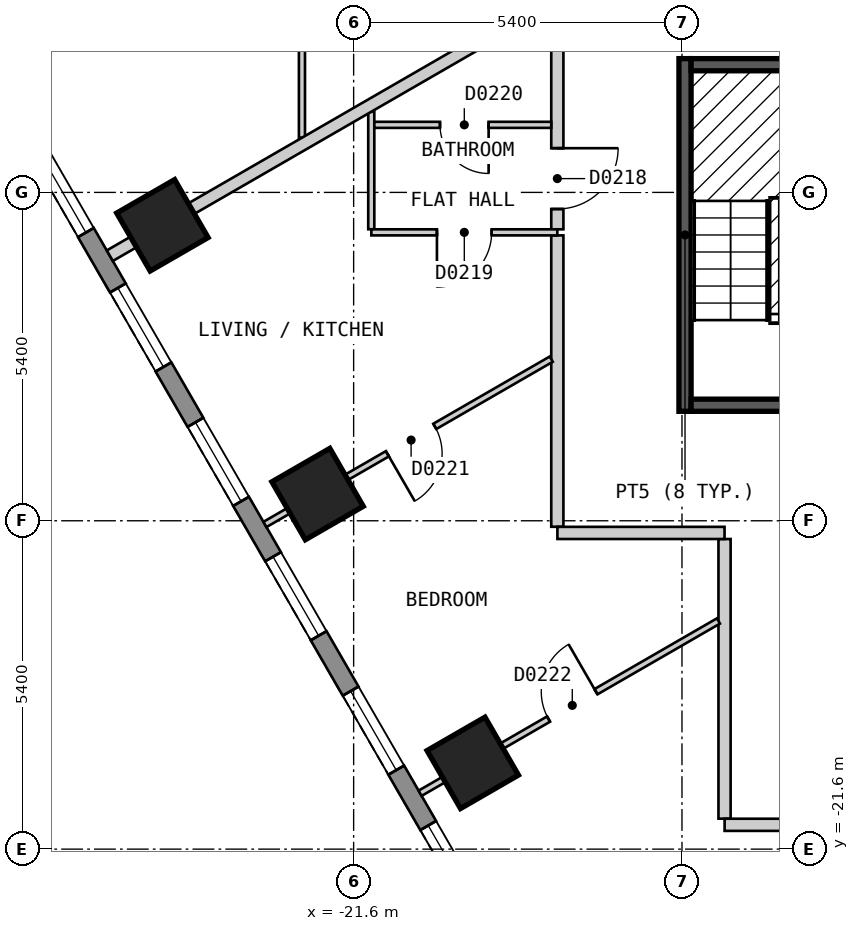
"""IFC4 building model, lengths in metres.
Left out: names, types, materials, properties, quantities, classifications, styles, units other than length and angle.
Written with IfcOpenShell. Run it as: python <this file> out.ifc"""

import sys

from ifc_helpers import new_model, si_unit, direction, frame, frame_2d, origin, origin_2d, place, context, subcontext, project, spatial, polyline, rectangle, outline, extrude, element, fill, save


model = new_model("IFC4")
c1 = context("Model", 3, precision=1e-05, world=origin(), true_north=direction((0.0, 1.0)))
c2 = subcontext(c1, "Body", "Model", "MODEL_VIEW")
j1 = project(units=[si_unit("LENGTHUNIT", "METRE"), si_unit("PLANEANGLEUNIT", "RADIAN")], contexts=[c1])
p1 = place(None, origin())
s1 = spatial("IfcSite", under=j1, at=p1, CompositionType="ELEMENT")
p2 = place(p1, origin())
s2 = spatial("IfcBuilding", under=s1, at=p2, CompositionType="ELEMENT")
p3 = place(p2, frame((0.0, 0.0, 41.4)))
s3 = spatial("IfcBuildingStorey", under=s2, at=p3, CompositionType="ELEMENT", Elevation=41.4)
for number, where, z_axis, x_axis in (
    (1, (-24.745, -11.341, 0.0), (0.0, 0.0, 1.0), (0.5, -0.866, 0.0)),
    (2, (-22.193, -15.761, 0.0), (0.0, 0.0, 1.0), (0.5, -0.866, 0.0)),
    (3, (-19.641, -20.181, 0.0), (0.0, 0.0, 1.0), (0.5, -0.866, 0.0)),
):
    element("IfcColumn", number, at=place(p3, frame(where, z_axis=z_axis, x_axis=x_axis)), inside=s3, PredefinedType="COLUMN", context=c2, shape_type="SweptSolid", body=[
        extrude(rectangle(XDim=1.1, YDim=1.1, at=origin_2d()), origin(), (0.0, 0.0, 1.0), 3.0),
    ])
p4 = place(p3, frame((-31.22, -2.425, 0.0), z_axis=(0.0, 0.0, 1.0), x_axis=(0.500001938803, -0.866024284413, 0.0)))
e4 = element("IfcWall", 4, at=p4, inside=s3, PredefinedType="SOLIDWALL", context=c2, shape_type="SweptSolid", body=[
    extrude(outline(polyline([(0.0, -0.15), (27.02, -0.15), (26.94, 0.15), (0.08, 0.15), (0.0, -0.15)])), origin(), (0.0, 0.0, 1.0), 2.7),
])
p5 = place(p4, frame((1.277, 0.0, 0.15)))
e5 = element("IfcOpeningElement", 5, at=p5, cuts=e4, PredefinedType="OPENING", context=c2, shape_type="SweptSolid", body=[
    extrude(rectangle(XDim=1.5, YDim=2.1, at=frame_2d((0.75, 1.05))), frame((0.0, 0.16, 0.0), z_axis=(0.0, -1.0, 0.0), x_axis=(1.0, 0.0, 0.0)), (0.0, 0.0, 1.0), 0.32),
])
p6 = place(p4, frame((3.829, 0.0, 0.15)))
e6 = element("IfcOpeningElement", 6, at=p6, cuts=e4, PredefinedType="OPENING", context=c2, shape_type="SweptSolid", body=[
    extrude(rectangle(XDim=1.5, YDim=2.1, at=frame_2d((0.75, 1.05))), frame((0.0, 0.16, 0.0), z_axis=(0.0, -1.0, 0.0), x_axis=(1.0, 0.0, 0.0)), (0.0, 0.0, 1.0), 0.32),
])
p7 = place(p4, frame((6.382, 0.0, 0.15)))
e7 = element("IfcOpeningElement", 7, at=p7, cuts=e4, PredefinedType="OPENING", context=c2, shape_type="SweptSolid", body=[
    extrude(rectangle(XDim=1.5, YDim=2.1, at=frame_2d((0.75, 1.05))), frame((0.0, 0.16, 0.0), z_axis=(0.0, -1.0, 0.0), x_axis=(1.0, 0.0, 0.0)), (0.0, 0.0, 1.0), 0.32),
])
p8 = place(p4, frame((8.933, 0.0, 0.15)))
e8 = element("IfcOpeningElement", 8, at=p8, cuts=e4, PredefinedType="OPENING", context=c2, shape_type="SweptSolid", body=[
    extrude(rectangle(XDim=1.5, YDim=2.1, at=frame_2d((0.75, 1.05))), frame((0.0, 0.16, 0.0), z_axis=(0.0, -1.0, 0.0), x_axis=(1.0, 0.0, 0.0)), (0.0, 0.0, 1.0), 0.32),
])
p9 = place(p4, frame((11.485, 0.0, 0.15)))
e9 = element("IfcOpeningElement", 9, at=p9, cuts=e4, PredefinedType="OPENING", context=c2, shape_type="SweptSolid", body=[
    extrude(rectangle(XDim=1.5, YDim=2.1, at=frame_2d((0.75, 1.05))), frame((0.0, 0.16, 0.0), z_axis=(0.0, -1.0, 0.0), x_axis=(1.0, 0.0, 0.0)), (0.0, 0.0, 1.0), 0.32),
])
p10 = place(p4, frame((14.037, 0.0, 0.15)))
e10 = element("IfcOpeningElement", 10, at=p10, cuts=e4, PredefinedType="OPENING", context=c2, shape_type="SweptSolid", body=[
    extrude(rectangle(XDim=1.5, YDim=2.1, at=frame_2d((0.75, 1.05))), frame((0.0, 0.16, 0.0), z_axis=(0.0, -1.0, 0.0), x_axis=(1.0, 0.0, 0.0)), (0.0, 0.0, 1.0), 0.32),
])
p11 = place(p4, frame((16.589, 0.0, 0.15)))
e11 = element("IfcOpeningElement", 11, at=p11, cuts=e4, PredefinedType="OPENING", context=c2, shape_type="SweptSolid", body=[
    extrude(rectangle(XDim=1.5, YDim=2.1, at=frame_2d((0.75, 1.05))), frame((0.0, 0.16, 0.0), z_axis=(0.0, -1.0, 0.0), x_axis=(1.0, 0.0, 0.0)), (0.0, 0.0, 1.0), 0.32),
])
p12 = place(p4, frame((19.141, 0.0, 0.15)))
e12 = element("IfcOpeningElement", 12, at=p12, cuts=e4, PredefinedType="OPENING", context=c2, shape_type="SweptSolid", body=[
    extrude(rectangle(XDim=1.5, YDim=2.1, at=frame_2d((0.75, 1.05))), frame((0.0, 0.16, 0.0), z_axis=(0.0, -1.0, 0.0), x_axis=(1.0, 0.0, 0.0)), (0.0, 0.0, 1.0), 0.32),
])
p13 = place(p4, frame((21.693, 0.0, 0.15)))
e13 = element("IfcOpeningElement", 13, at=p13, cuts=e4, PredefinedType="OPENING", context=c2, shape_type="SweptSolid", body=[
    extrude(rectangle(XDim=1.5, YDim=2.1, at=frame_2d((0.75, 1.05))), frame((0.0, 0.16, 0.0), z_axis=(0.0, -1.0, 0.0), x_axis=(1.0, 0.0, 0.0)), (0.0, 0.0, 1.0), 0.32),
])
p14 = place(p4, frame((24.244, 0.0, 0.15)))
e14 = element("IfcOpeningElement", 14, at=p14, cuts=e4, PredefinedType="OPENING", context=c2, shape_type="SweptSolid", body=[
    extrude(rectangle(XDim=1.5, YDim=2.1, at=frame_2d((0.75, 1.05))), frame((0.0, 0.16, 0.0), z_axis=(0.0, -1.0, 0.0), x_axis=(1.0, 0.0, 0.0)), (0.0, 0.0, 1.0), 0.32),
])
p15 = place(p3, frame((-15.5, -16.5, 0.0), z_axis=(0.0, 0.0, 1.0), x_axis=(0.0, -1.0, 0.0)))
e15 = element("IfcWall", 15, at=p15, inside=s3, PredefinedType="PARTITIONING", context=c2, shape_type="SweptSolid", body=[
    extrude(rectangle(XDim=4.599, YDim=0.2, at=frame_2d((2.3, 0.0))), origin(), (0.0, 0.0, 1.0), 2.7),
])
p16 = place(p3, frame((-18.25, -11.507, 0.0), z_axis=(0.0, 0.0, 1.0), x_axis=(0.0, -1.0, 0.0)))
e16 = element("IfcWall", 16, at=p16, inside=s3, PredefinedType="PARTITIONING", context=c2, shape_type="SweptSolid", body=[
    extrude(rectangle(XDim=4.792, YDim=0.2, at=frame_2d((2.396, 0.0))), origin(), (0.0, 0.0, 1.0), 2.7),
])
p17 = place(p3, frame((-18.249, -16.4, 0.0), z_axis=(0.0, 0.0, 1.0), x_axis=(1.0, 0.0, 0.0)))
e17 = element("IfcWall", 17, at=p17, inside=s3, PredefinedType="PARTITIONING", context=c2, shape_type="SweptSolid", body=[
    extrude(rectangle(XDim=2.749, YDim=0.2, at=frame_2d((1.375, 0.0))), origin(), (0.0, 0.0, 1.0), 2.7),
])
p18 = place(p3, frame((-15.499, -21.2, 0.0), z_axis=(0.0, 0.0, 1.0), x_axis=(1.0, 0.0, 0.0)))
e18 = element("IfcWall", 18, at=p18, inside=s3, PredefinedType="PARTITIONING", context=c2, shape_type="SweptSolid", body=[
    extrude(rectangle(XDim=30.898, YDim=0.2, at=frame_2d((15.449, 0.0))), origin(), (0.0, 0.0, 1.0), 2.7),
])
p19 = place(p18, frame((5.084, 0.0, 0.0)))
e19 = element("IfcOpeningElement", 19, at=p19, cuts=e18, PredefinedType="OPENING", context=c2, shape_type="SweptSolid", body=[
    extrude(rectangle(XDim=0.9, YDim=2.1, at=frame_2d((0.45, 1.05))), frame((0.0, 0.11, 0.0), z_axis=(0.0, -1.0, 0.0), x_axis=(1.0, 0.0, 0.0)), (0.0, 0.0, 1.0), 0.22),
])
p20 = place(p18, frame((15.0, 0.0, 0.0)))
e20 = element("IfcOpeningElement", 20, at=p20, cuts=e18, PredefinedType="OPENING", context=c2, shape_type="SweptSolid", body=[
    extrude(rectangle(XDim=1.0, YDim=2.1, at=frame_2d((0.5, 1.05))), frame((0.0, 0.11, 0.0), z_axis=(0.0, -1.0, 0.0), x_axis=(1.0, 0.0, 0.0)), (0.0, 0.0, 1.0), 0.22),
])
p21 = place(p18, frame((25.015, 0.0, 0.0)))
e21 = element("IfcOpeningElement", 21, at=p21, cuts=e18, PredefinedType="OPENING", context=c2, shape_type="SweptSolid", body=[
    extrude(rectangle(XDim=0.9, YDim=2.1, at=frame_2d((0.45, 1.05))), frame((0.0, 0.11, 0.0), z_axis=(0.0, -1.0, 0.0), x_axis=(1.0, 0.0, 0.0)), (0.0, 0.0, 1.0), 0.22),
])
p22 = place(p3, frame((-18.25, -11.407, 0.0), z_axis=(0.0, 0.0, 1.0), x_axis=(0.0, 1.0, 0.0)))
e22 = element("IfcWall", 22, at=p22, inside=s3, PredefinedType="PARTITIONING", context=c2, shape_type="SweptSolid", body=[
    extrude(rectangle(XDim=3.665, YDim=0.2, at=frame_2d((1.833, 0.0))), origin(), (0.0, 0.0, 1.0), 2.7),
])
p23 = place(p22, frame((0.334, 0.0, 0.0)))
e23 = element("IfcOpeningElement", 23, at=p23, cuts=e22, PredefinedType="OPENING", context=c2, shape_type="SweptSolid", body=[
    extrude(rectangle(XDim=1.0, YDim=2.1, at=frame_2d((0.5, 1.05))), frame((0.0, 0.11, 0.0), z_axis=(0.0, -1.0, 0.0), x_axis=(1.0, 0.0, 0.0)), (0.0, 0.0, 1.0), 0.22),
])
p24 = place(p3, frame((-21.31, -9.474, 0.0), z_axis=(0.0, 0.0, 1.0), x_axis=(0.0, -1.0, 0.0)))
e24 = element("IfcWall", 24, at=p24, inside=s3, PredefinedType="PARTITIONING", context=c2, shape_type="SweptSolid", body=[
    extrude(rectangle(XDim=1.932, YDim=0.1, at=frame_2d((0.966, 0.0))), origin(), (0.0, 0.0, 1.0), 2.7),
])
p25 = place(p3, frame((-21.26, -9.689, 0.0), z_axis=(0.0, 0.0, 1.0), x_axis=(1.0, 0.0, 0.0)))
e25 = element("IfcWall", 25, at=p25, inside=s3, PredefinedType="PARTITIONING", context=c2, shape_type="SweptSolid", body=[
    extrude(rectangle(XDim=2.91, YDim=0.1, at=frame_2d((1.455, 0.0))), origin(), (0.0, 0.0, 1.0), 2.7),
])
p26 = place(p25, frame((1.08, 0.0, 0.0)))
e26 = element("IfcOpeningElement", 26, at=p26, cuts=e25, PredefinedType="OPENING", context=c2, shape_type="SweptSolid", body=[
    extrude(rectangle(XDim=0.8, YDim=2.1, at=frame_2d((0.4, 1.05))), frame((0.0, 0.06, 0.0), z_axis=(0.0, -1.0, 0.0), x_axis=(1.0, 0.0, 0.0)), (0.0, 0.0, 1.0), 0.12),
])
p27 = place(p3, frame((-21.309, -11.457, 0.0), z_axis=(0.0, 0.0, 1.0), x_axis=(1.0, 0.0, 0.0)))
e27 = element("IfcWall", 27, at=p27, inside=s3, PredefinedType="PARTITIONING", context=c2, shape_type="SweptSolid", body=[
    extrude(rectangle(XDim=3.059, YDim=0.1, at=frame_2d((1.53, 0.0))), origin(), (0.0, 0.0, 1.0), 2.7),
])
p28 = place(p27, frame((1.079, 0.0, 0.0)))
e28 = element("IfcOpeningElement", 28, at=p28, cuts=e27, PredefinedType="OPENING", context=c2, shape_type="SweptSolid", body=[
    extrude(rectangle(XDim=0.9, YDim=2.1, at=frame_2d((0.45, 1.05))), frame((0.0, 0.06, 0.0), z_axis=(0.0, -1.0, 0.0), x_axis=(1.0, 0.0, 0.0)), (0.0, 0.0, 1.0), 0.12),
])
p29 = place(p3, frame((-22.45, -9.901, 0.0), z_axis=(0.0, 0.0, 1.0), x_axis=(0.0, 1.0, 0.0)))
e29 = element("IfcWall", 29, at=p29, inside=s3, PredefinedType="PARTITIONING", context=c2, shape_type="SweptSolid", body=[
    extrude(rectangle(XDim=4.385, YDim=0.1, at=frame_2d((2.192, 0.0))), origin(), (0.0, 0.0, 1.0), 2.7),
])
p30 = place(p29, frame((2.855, 0.0, 0.0)))
e30 = element("IfcOpeningElement", 30, at=p30, cuts=e29, PredefinedType="OPENING", context=c2, shape_type="SweptSolid", body=[
    extrude(rectangle(XDim=0.9, YDim=2.1, at=frame_2d((0.45, 1.05))), frame((0.0, 0.06, 0.0), z_axis=(0.0, -1.0, 0.0), x_axis=(1.0, 0.0, 0.0)), (0.0, 0.0, 1.0), 0.12),
])
p31 = place(p3, frame((-20.507, -20.681, 0.0), z_axis=(0.0, 0.0, 1.0), x_axis=(0.866028446103, 0.499994730513, 0.0)))
e31 = element("IfcWall", 31, at=p31, inside=s3, PredefinedType="PARTITIONING", context=c2, shape_type="SweptSolid", body=[
    extrude(rectangle(XDim=5.666, YDim=0.1, at=frame_2d((2.833, 0.0))), origin(), (0.0, 0.0, 1.0), 2.7),
])
p32 = place(p31, frame((2.44, 0.0, 0.0)))
e32 = element("IfcOpeningElement", 32, at=p32, cuts=e31, PredefinedType="OPENING", context=c2, shape_type="SweptSolid", body=[
    extrude(rectangle(XDim=0.9, YDim=2.1, at=frame_2d((0.45, 1.05))), frame((0.0, 0.06, 0.0), z_axis=(0.0, -1.0, 0.0), x_axis=(1.0, 0.0, 0.0)), (0.0, 0.0, 1.0), 0.12),
])
p33 = place(p3, frame((-23.059, -16.261, 0.0), z_axis=(0.0, 0.0, 1.0), x_axis=(0.866004639177, 0.500035963631, 0.0)))
e33 = element("IfcWall", 33, at=p33, inside=s3, PredefinedType="PARTITIONING", context=c2, shape_type="SweptSolid", body=[
    extrude(rectangle(XDim=5.438, YDim=0.1, at=frame_2d((2.719, 0.0))), origin(), (0.0, 0.0, 1.0), 2.7),
])
p34 = place(p33, frame((2.326, 0.0, 0.0)))
e34 = element("IfcOpeningElement", 34, at=p34, cuts=e33, PredefinedType="OPENING", context=c2, shape_type="SweptSolid", body=[
    extrude(rectangle(XDim=0.9, YDim=2.1, at=frame_2d((0.45, 1.05))), frame((0.0, 0.06, 0.0), z_axis=(0.0, -1.0, 0.0), x_axis=(1.0, 0.0, 0.0)), (0.0, 0.0, 1.0), 0.12),
])
p35 = place(p3, frame((-25.61, -11.841, 0.0), z_axis=(0.0, 0.0, 1.0), x_axis=(0.866019023803, 0.500011050288, 0.0)))
e35 = element("IfcWall", 35, at=p35, inside=s3, PredefinedType="PARTITIONING", context=c2, shape_type="SweptSolid", body=[
    extrude(rectangle(XDim=8.47, YDim=0.2, at=frame_2d((4.235, 0.0))), origin(), (0.0, 0.0, 1.0), 2.7),
])
p36 = place(p3, frame((-16.15, -14.4, 0.0), z_axis=(0.0, 0.0, 1.0), x_axis=(0.0, 1.0, 0.0)))
e36 = element("IfcWall", 36, at=p36, inside=s3, PredefinedType="SOLIDWALL", context=c2, shape_type="SweptSolid", body=[
    extrude(rectangle(XDim=5.8, YDim=0.2, at=frame_2d((2.9, 0.0))), origin(), (0.0, 0.0, 1.0), 2.7),
])
for number, where, z_axis, x_axis in (
    (37, (-16.05, -14.3, 0.0), (0.0, 0.0, 1.0), (1.0, 0.0, 0.0)),
    (38, (-16.05, -8.7, 0.0), (0.0, 0.0, 1.0), (1.0, 0.0, 0.0)),
):
    element("IfcWall", number, at=place(p3, frame(where, z_axis=z_axis, x_axis=x_axis)), inside=s3, PredefinedType="SOLIDWALL", context=c2, shape_type="SweptSolid", body=[
        extrude(rectangle(XDim=2.75, YDim=0.2, at=frame_2d((1.375, 0.0))), origin(), (0.0, 0.0, 1.0), 2.7),
    ])
p37 = place(p8, origin())
e39 = element("IfcWindow", 39, at=p37, inside=s3, PartitioningType="SINGLE_PANEL", PredefinedType="WINDOW", context=c2, shape_type="SweptSolid", body=[
    extrude(rectangle(XDim=1.5, YDim=2.1, at=frame_2d((0.75, 1.05))), frame((0.0, 0.03, 0.0), z_axis=(0.0, -1.0, 0.0), x_axis=(1.0, 0.0, 0.0)), (0.0, 0.0, 1.0), 0.06),
])
fill(e8, e39)
p38 = place(p9, origin())
e40 = element("IfcWindow", 40, at=p38, inside=s3, PartitioningType="SINGLE_PANEL", PredefinedType="WINDOW", context=c2, shape_type="SweptSolid", body=[
    extrude(rectangle(XDim=1.5, YDim=2.1, at=frame_2d((0.75, 1.05))), frame((0.0, 0.03, 0.0), z_axis=(0.0, -1.0, 0.0), x_axis=(1.0, 0.0, 0.0)), (0.0, 0.0, 1.0), 0.06),
])
fill(e9, e40)
p39 = place(p10, origin())
e41 = element("IfcWindow", 41, at=p39, inside=s3, PartitioningType="SINGLE_PANEL", PredefinedType="WINDOW", context=c2, shape_type="SweptSolid", body=[
    extrude(rectangle(XDim=1.5, YDim=2.1, at=frame_2d((0.75, 1.05))), frame((0.0, 0.03, 0.0), z_axis=(0.0, -1.0, 0.0), x_axis=(1.0, 0.0, 0.0)), (0.0, 0.0, 1.0), 0.06),
])
fill(e10, e41)
p40 = place(p11, origin())
e42 = element("IfcWindow", 42, at=p40, inside=s3, PartitioningType="SINGLE_PANEL", PredefinedType="WINDOW", context=c2, shape_type="SweptSolid", body=[
    extrude(rectangle(XDim=1.5, YDim=2.1, at=frame_2d((0.75, 1.05))), frame((0.0, 0.03, 0.0), z_axis=(0.0, -1.0, 0.0), x_axis=(1.0, 0.0, 0.0)), (0.0, 0.0, 1.0), 0.06),
])
fill(e11, e42)
p41 = place(p12, origin())
e43 = element("IfcWindow", 43, at=p41, inside=s3, PartitioningType="SINGLE_PANEL", PredefinedType="WINDOW", context=c2, shape_type="SweptSolid", body=[
    extrude(rectangle(XDim=1.5, YDim=2.1, at=frame_2d((0.75, 1.05))), frame((0.0, 0.03, 0.0), z_axis=(0.0, -1.0, 0.0), x_axis=(1.0, 0.0, 0.0)), (0.0, 0.0, 1.0), 0.06),
])
fill(e12, e43)
p42 = place(p13, origin())
e44 = element("IfcWindow", 44, at=p42, inside=s3, PartitioningType="SINGLE_PANEL", PredefinedType="WINDOW", context=c2, shape_type="SweptSolid", body=[
    extrude(rectangle(XDim=1.5, YDim=2.1, at=frame_2d((0.75, 1.05))), frame((0.0, 0.03, 0.0), z_axis=(0.0, -1.0, 0.0), x_axis=(1.0, 0.0, 0.0)), (0.0, 0.0, 1.0), 0.06),
])
fill(e13, e44)
p43 = place(p23, origin())
e45 = element("IfcDoor", 45, at=p43, inside=s3, OperationType="SINGLE_SWING_RIGHT", PredefinedType="DOOR", context=c2, shape_type="SweptSolid", body=[
    extrude(rectangle(XDim=1.0, YDim=2.1, at=frame_2d((0.5, 1.05))), frame((0.0, 0.025, 0.0), z_axis=(0.0, -1.0, 0.0), x_axis=(1.0, 0.0, 0.0)), (0.0, 0.0, 1.0), 0.05),
])
fill(e23, e45)
p44 = place(p28, origin())
e46 = element("IfcDoor", 46, at=p44, inside=s3, OperationType="SINGLE_SWING_LEFT", PredefinedType="DOOR", context=c2, shape_type="SweptSolid", body=[
    extrude(rectangle(XDim=0.9, YDim=2.1, at=frame_2d((0.45, 1.05))), frame((0.0, 0.025, 0.0), z_axis=(0.0, -1.0, 0.0), x_axis=(1.0, 0.0, 0.0)), (0.0, 0.0, 1.0), 0.05),
])
fill(e28, e46)
p45 = place(p26, origin())
e47 = element("IfcDoor", 47, at=p45, inside=s3, OperationType="SINGLE_SWING_RIGHT", PredefinedType="DOOR", context=c2, shape_type="SweptSolid", body=[
    extrude(rectangle(XDim=0.8, YDim=2.1, at=frame_2d((0.4, 1.05))), frame((0.0, 0.025, 0.0), z_axis=(0.0, -1.0, 0.0), x_axis=(1.0, 0.0, 0.0)), (0.0, 0.0, 1.0), 0.05),
])
fill(e26, e47)
p46 = place(p34, origin())
e48 = element("IfcDoor", 48, at=p46, inside=s3, OperationType="SINGLE_SWING_LEFT", PredefinedType="DOOR", context=c2, shape_type="SweptSolid", body=[
    extrude(rectangle(XDim=0.9, YDim=2.1, at=frame_2d((0.45, 1.05))), frame((0.0, 0.025, 0.0), z_axis=(0.0, -1.0, 0.0), x_axis=(1.0, 0.0, 0.0)), (0.0, 0.0, 1.0), 0.05),
])
fill(e34, e48)
p47 = place(p32, origin())
e49 = element("IfcDoor", 49, at=p47, inside=s3, OperationType="SINGLE_SWING_RIGHT", PredefinedType="DOOR", context=c2, shape_type="SweptSolid", body=[
    extrude(rectangle(XDim=0.9, YDim=2.1, at=frame_2d((0.45, 1.05))), frame((0.0, 0.025, 0.0), z_axis=(0.0, -1.0, 0.0), x_axis=(1.0, 0.0, 0.0)), (0.0, 0.0, 1.0), 0.05),
])
fill(e32, e49)
save(model, sys.argv[1])
